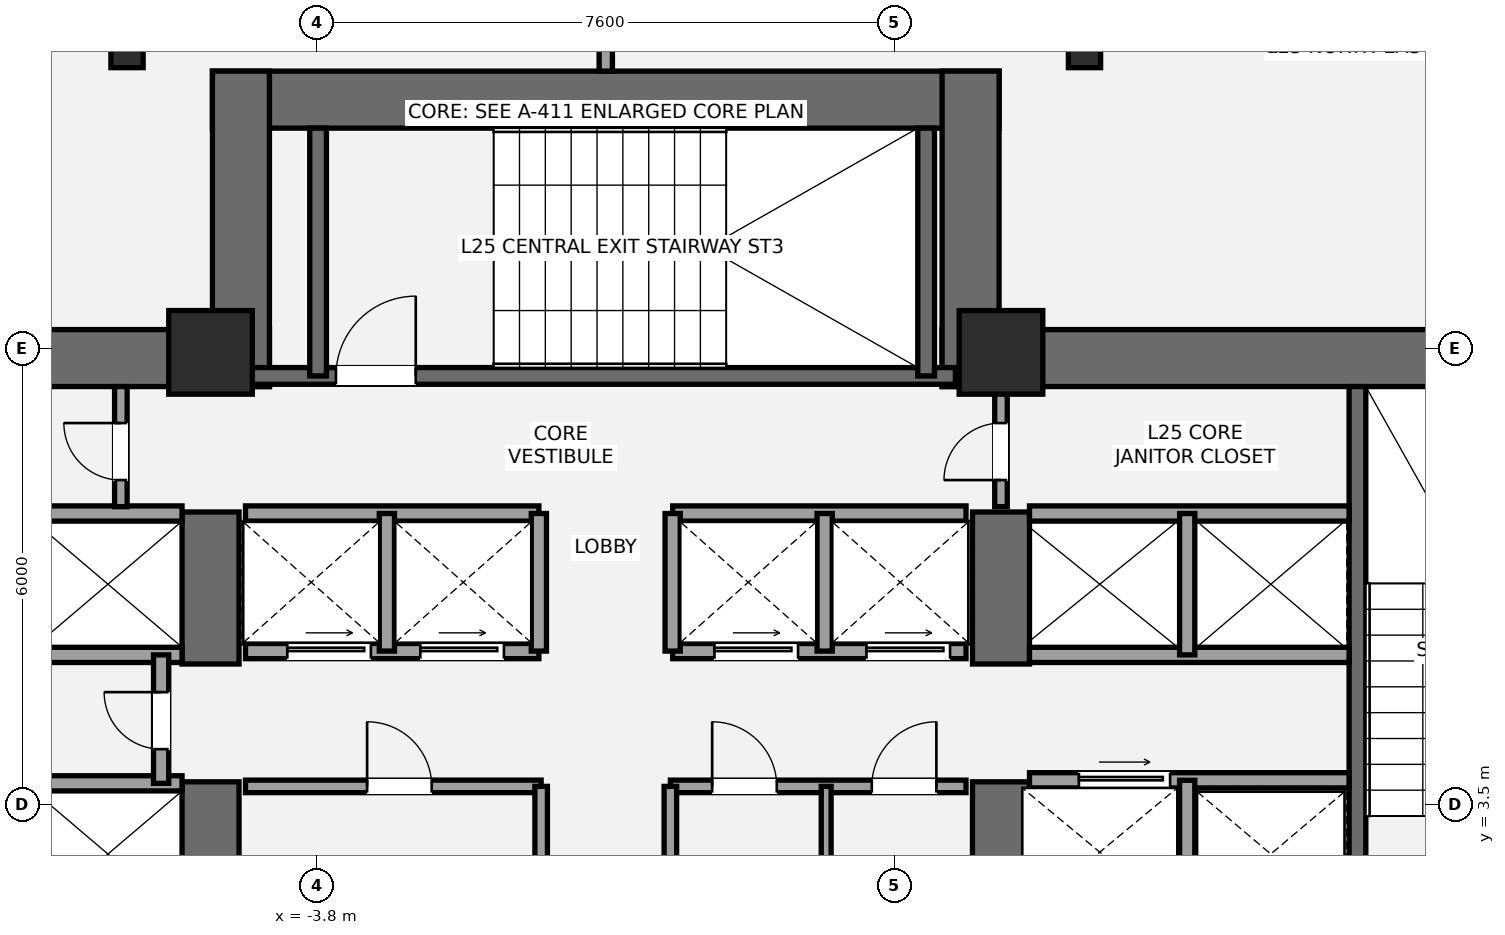
"""IFC4 building model, lengths in metres.
Left out: names, types, materials, properties, quantities, classifications, styles, units other than length and angle.
Written with IfcOpenShell. Run it as: python <this file> out.ifc"""

import sys

from ifc_helpers import new_model, si_unit, direction, frame, frame_2d, origin, origin_2d, place, context, subcontext, project, spatial, rectangle, i_section, extrude, element, fill, save


model = new_model("IFC4")
c1 = context("Model", 3, precision=1e-05, world=origin(), true_north=direction((0.0, 1.0)))
c2 = subcontext(c1, "Body", "Model", "MODEL_VIEW")
j1 = project(units=[si_unit("LENGTHUNIT", "METRE"), si_unit("PLANEANGLEUNIT", "RADIAN")], contexts=[c1])
p1 = place(None, origin())
s1 = spatial("IfcSite", under=j1, at=p1, CompositionType="ELEMENT")
p2 = place(p1, origin())
s2 = spatial("IfcBuilding", under=s1, at=p2, CompositionType="ELEMENT")
p3 = place(p2, frame((0.0, 0.0, 96.6)))
s3 = spatial("IfcBuildingStorey", under=s2, at=p3, CompositionType="ELEMENT", Elevation=96.6)
p4 = place(p3, frame((-13.9, 9.375, 0.0), z_axis=(0.0, 0.0, 1.0), x_axis=(1.0, 0.0, 0.0)))
e1 = element("IfcWall", 1, at=p4, inside=s3, PredefinedType="SHEAR", context=c2, shape_type="SweptSolid", body=[
    extrude(rectangle(XDim=9.475, YDim=0.75, at=frame_2d((4.737, 0.0))), origin(), (0.0, 0.0, 1.0), 3.5),
])
p5 = place(p3, frame((-5.2, 1.1, 0.0), z_axis=(0.0, 0.0, 1.0), x_axis=(0.0, 1.0, 0.0)))
e2 = element("IfcWall", 2, at=p5, inside=s3, PredefinedType="SHEAR", context=c2, shape_type="SweptSolid", body=[
    extrude(rectangle(XDim=2.7, YDim=0.75, at=frame_2d((1.35, 0.0))), origin(), (0.0, 0.0, 1.0), 3.5),
])
p6 = place(p3, frame((-5.2, 5.35, 0.0), z_axis=(0.0, 0.0, 1.0), x_axis=(0.0, 1.0, 0.0)))
e3 = element("IfcWall", 3, at=p6, inside=s3, PredefinedType="SHEAR", context=c2, shape_type="SweptSolid", body=[
    extrude(rectangle(XDim=2.0, YDim=0.75, at=frame_2d((1.0, 0.0))), origin(), (0.0, 0.0, 1.0), 3.5),
])
p7 = place(p3, frame((4.425, 9.375, 0.0), z_axis=(0.0, 0.0, 1.0), x_axis=(1.0, 0.0, 0.0)))
e4 = element("IfcWall", 4, at=p7, inside=s3, PredefinedType="SHEAR", context=c2, shape_type="SweptSolid", body=[
    extrude(rectangle(XDim=9.475, YDim=0.75, at=frame_2d((4.737, 0.0))), origin(), (0.0, 0.0, 1.0), 3.5),
])
p8 = place(p3, frame((5.2, 1.1, 0.0), z_axis=(0.0, 0.0, 1.0), x_axis=(0.0, 1.0, 0.0)))
e5 = element("IfcWall", 5, at=p8, inside=s3, PredefinedType="SHEAR", context=c2, shape_type="SweptSolid", body=[
    extrude(rectangle(XDim=2.7, YDim=0.75, at=frame_2d((1.35, 0.0))), origin(), (0.0, 0.0, 1.0), 3.5),
])
p9 = place(p3, frame((5.2, 5.35, 0.0), z_axis=(0.0, 0.0, 1.0), x_axis=(0.0, 1.0, 0.0)))
e6 = element("IfcWall", 6, at=p9, inside=s3, PredefinedType="SHEAR", context=c2, shape_type="SweptSolid", body=[
    extrude(rectangle(XDim=2.0, YDim=0.75, at=frame_2d((1.0, 0.0))), origin(), (0.0, 0.0, 1.0), 3.5),
])
p10 = place(p3, frame((9.89, 1.85, 0.0), z_axis=(0.0, 0.0, 1.0), x_axis=(0.0, 1.0, 0.0)))
e7 = element("IfcWall", 7, at=p10, inside=s3, PredefinedType="SHEAR", context=c2, shape_type="SweptSolid", body=[
    extrude(rectangle(XDim=7.15, YDim=0.22, at=frame_2d((3.575, 0.0))), origin(), (0.0, 0.0, 1.0), 3.5),
])
p11 = place(p3, frame((-5.175, 12.775, 0.0), z_axis=(0.0, 0.0, 1.0), x_axis=(1.0, 0.0, 0.0)))
e8 = element("IfcWall", 8, at=p11, inside=s3, PredefinedType="SHEAR", context=c2, shape_type="SweptSolid", body=[
    extrude(rectangle(XDim=10.35, YDim=0.75, at=frame_2d((5.175, 0.0))), origin(), (0.0, 0.0, 1.0), 3.5),
])
for number, where, z_axis, x_axis in (
    (9, (-4.8, 9.0, 0.0), (0.0, 0.0, 1.0), (0.0, 1.0, 0.0)),
    (10, (4.8, 9.0, 0.0), (0.0, 0.0, 1.0), (0.0, 1.0, 0.0)),
):
    element("IfcWall", number, at=place(p3, frame(where, z_axis=z_axis, x_axis=x_axis)), inside=s3, PredefinedType="SHEAR", context=c2, shape_type="SweptSolid", body=[
        extrude(rectangle(XDim=4.15, YDim=0.75, at=frame_2d((2.075, 0.0))), origin(), (0.0, 0.0, 1.0), 3.5),
    ])
p12 = place(p3, frame((-4.7, 9.14, 0.0), z_axis=(0.0, 0.0, 1.0), x_axis=(1.0, 0.0, 0.0)))
e11 = element("IfcWall", 11, at=p12, inside=s3, PredefinedType="SHEAR", context=c2, shape_type="SweptSolid", body=[
    extrude(rectangle(XDim=9.3, YDim=0.22, at=frame_2d((4.65, 0.0))), origin(), (0.0, 0.0, 1.0), 3.5),
])
p13 = place(p12, frame((1.15, 0.0, 0.0)))
e12 = element("IfcOpeningElement", 12, at=p13, cuts=e11, PredefinedType="OPENING", context=c2, shape_type="SweptSolid", body=[
    extrude(rectangle(XDim=1.05, YDim=2.15, at=frame_2d((0.525, 1.075))), frame((0.0, 0.12, 0.0), z_axis=(0.0, -1.0, 0.0), x_axis=(1.0, 0.0, 0.0)), (0.0, 0.0, 1.0), 0.24),
])
for number, where, z_axis, x_axis in (
    (13, (-3.785, 9.14, 0.0), (0.0, 0.0, 1.0), (0.0, 1.0, 0.0)),
    (14, (4.215, 9.14, 0.0), (0.0, 0.0, 1.0), (0.0, 1.0, 0.0)),
):
    element("IfcWall", number, at=place(p3, frame(where, z_axis=z_axis, x_axis=x_axis)), inside=s3, PredefinedType="SHEAR", context=c2, shape_type="SweptSolid", body=[
        extrude(rectangle(XDim=3.26, YDim=0.22, at=frame_2d((1.63, 0.0))), origin(), (0.0, 0.0, 1.0), 3.5),
    ])
for number, where, z_axis, x_axis in (
    (15, (-5.2, 9.45, 0.0), (0.0, 0.0, 1.0), (1.0, 0.0, 0.0)),
    (16, (5.2, 9.45, 0.0), (0.0, 0.0, 1.0), (1.0, 0.0, 0.0)),
):
    element("IfcColumn", number, at=place(p3, frame(where, z_axis=z_axis, x_axis=x_axis)), inside=s3, PredefinedType="COLUMN", context=c2, shape_type="SweptSolid", body=[
        extrude(rectangle(XDim=1.1, YDim=1.1, at=origin_2d()), origin(), (0.0, 0.0, 1.0), 3.5),
    ])
for number, where, z_axis, x_axis in (
    (17, (6.299, 13.433, 0.0), (0.0, 0.0, 1.0), (1.0, 0.0, 0.0)),
    (18, (-6.299, 13.433, 0.0), (0.0, 0.0, 1.0), (1.0, 0.0, 0.0)),
):
    element("IfcColumn", number, at=place(p3, frame(where, z_axis=z_axis, x_axis=x_axis)), inside=s3, PredefinedType="COLUMN", context=c2, shape_type="SweptSolid", body=[
        extrude(i_section(OverallWidth=0.424, OverallDepth=0.474, WebThickness=0.048, FlangeThickness=0.077, at=origin_2d()), origin(), (0.0, 0.0, 1.0), 3.5),
    ])
for number, where, z_axis, x_axis in (
    (19, (-9.78, 3.78, 0.0), (0.0, 0.0, 1.0), (1.0, 0.0, 0.0)),
    (20, (-9.78, 5.47, 0.0), (0.0, 0.0, 1.0), (1.0, 0.0, 0.0)),
    (21, (-9.78, 7.33, 0.0), (0.0, 0.0, 1.0), (1.0, 0.0, 0.0)),
):
    element("IfcWall", number, at=place(p3, frame(where, z_axis=z_axis, x_axis=x_axis)), inside=s3, PredefinedType="SOLIDWALL", context=c2, shape_type="SweptSolid", body=[
        extrude(rectangle(XDim=4.205, YDim=0.2, at=frame_2d((2.103, 0.0))), origin(), (0.0, 0.0, 1.0), 3.31),
    ])
p14 = place(p3, frame((-5.85, 3.78, 0.0), z_axis=(0.0, 0.0, 1.0), x_axis=(0.0, 1.0, 0.0)))
e22 = element("IfcWall", 22, at=p14, inside=s3, PredefinedType="SOLIDWALL", context=c2, shape_type="SweptSolid", body=[
    extrude(rectangle(XDim=1.69, YDim=0.2, at=frame_2d((0.845, 0.0))), origin(), (0.0, 0.0, 1.0), 3.31),
])
p15 = place(p14, frame((0.45, 0.0, 0.0)))
e23 = element("IfcOpeningElement", 23, at=p15, cuts=e22, PredefinedType="OPENING", context=c2, shape_type="SweptSolid", body=[
    extrude(rectangle(XDim=0.75, YDim=2.1, at=frame_2d((0.375, 1.05))), frame((0.0, 0.11, 0.0), z_axis=(0.0, -1.0, 0.0), x_axis=(1.0, 0.0, 0.0)), (0.0, 0.0, 1.0), 0.22),
])
p16 = place(p3, frame((5.575, 3.82, 0.0), z_axis=(0.0, 0.0, 1.0), x_axis=(1.0, 0.0, 0.0)))
e24 = element("IfcWall", 24, at=p16, inside=s3, PredefinedType="SOLIDWALL", context=c2, shape_type="SweptSolid", body=[
    extrude(rectangle(XDim=4.205, YDim=0.2, at=frame_2d((2.103, 0.0))), origin(), (0.0, 0.0, 1.0), 3.31),
])
p17 = place(p16, frame((0.65, 0.0, 0.0)))
e25 = element("IfcOpeningElement", 25, at=p17, cuts=e24, PredefinedType="OPENING", context=c2, shape_type="SweptSolid", body=[
    extrude(rectangle(XDim=1.2, YDim=2.2, at=frame_2d((0.6, 1.1))), frame((0.0, 0.11, 0.0), z_axis=(0.0, -1.0, 0.0), x_axis=(1.0, 0.0, 0.0)), (0.0, 0.0, 1.0), 0.22),
])
p18 = place(p3, frame((7.65, 1.85, 0.0), z_axis=(0.0, 0.0, 1.0), x_axis=(0.0, 1.0, 0.0)))
e26 = element("IfcWall", 26, at=p18, inside=s3, PredefinedType="SOLIDWALL", context=c2, shape_type="SweptSolid", body=[
    extrude(rectangle(XDim=1.97, YDim=0.2, at=frame_2d((0.985, 0.0))), origin(), (0.0, 0.0, 1.0), 3.31),
])
for number, where, z_axis, x_axis in (
    (27, (5.575, 5.47, 0.0), (0.0, 0.0, 1.0), (1.0, 0.0, 0.0)),
    (28, (5.575, 7.33, 0.0), (0.0, 0.0, 1.0), (1.0, 0.0, 0.0)),
):
    element("IfcWall", number, at=place(p3, frame(where, z_axis=z_axis, x_axis=x_axis)), inside=s3, PredefinedType="SOLIDWALL", context=c2, shape_type="SweptSolid", body=[
        extrude(rectangle(XDim=4.205, YDim=0.2, at=frame_2d((2.103, 0.0))), origin(), (0.0, 0.0, 1.0), 3.31),
    ])
p19 = place(p3, frame((7.65, 5.47, 0.0), z_axis=(0.0, 0.0, 1.0), x_axis=(0.0, 1.0, 0.0)))
e29 = element("IfcWall", 29, at=p19, inside=s3, PredefinedType="SOLIDWALL", context=c2, shape_type="SweptSolid", body=[
    extrude(rectangle(XDim=1.86, YDim=0.2, at=frame_2d((0.93, 0.0))), origin(), (0.0, 0.0, 1.0), 3.31),
])
p20 = place(p3, frame((-4.74, 3.74, 0.0), z_axis=(0.0, 0.0, 1.0), x_axis=(1.0, 0.0, 0.0)))
e30 = element("IfcWall", 30, at=p20, inside=s3, PredefinedType="PARTITIONING", context=c2, shape_type="SweptSolid", body=[
    extrude(rectangle(XDim=3.89, YDim=0.165, at=frame_2d((1.945, 0.0))), origin(), (0.0, 0.0, 1.0), 3.31),
])
p21 = place(p20, frame((1.6, 0.0, 0.0)))
e31 = element("IfcOpeningElement", 31, at=p21, cuts=e30, PredefinedType="OPENING", context=c2, shape_type="SweptSolid", body=[
    extrude(rectangle(XDim=0.85, YDim=2.1, at=frame_2d((0.425, 1.05))), frame((0.0, 0.093, 0.0), z_axis=(0.0, -1.0, 0.0), x_axis=(1.0, 0.0, 0.0)), (0.0, 0.0, 1.0), 0.185),
])
p22 = place(p3, frame((-0.85, 1.92, 0.0), z_axis=(0.0, 0.0, 1.0), x_axis=(0.0, 1.0, 0.0)))
e32 = element("IfcWall", 32, at=p22, inside=s3, PredefinedType="PARTITIONING", context=c2, shape_type="SweptSolid", body=[
    extrude(rectangle(XDim=1.82, YDim=0.165, at=frame_2d((0.91, 0.0))), origin(), (0.0, 0.0, 1.0), 3.31),
])
p23 = place(p3, frame((0.85, 3.74, 0.0), z_axis=(0.0, 0.0, 1.0), x_axis=(1.0, 0.0, 0.0)))
e33 = element("IfcWall", 33, at=p23, inside=s3, PredefinedType="PARTITIONING", context=c2, shape_type="SweptSolid", body=[
    extrude(rectangle(XDim=3.89, YDim=0.165, at=frame_2d((1.945, 0.0))), origin(), (0.0, 0.0, 1.0), 3.31),
])
p24 = place(p23, frame((0.55, 0.0, 0.0)))
e34 = element("IfcOpeningElement", 34, at=p24, cuts=e33, PredefinedType="OPENING", context=c2, shape_type="SweptSolid", body=[
    extrude(rectangle(XDim=0.85, YDim=2.1, at=frame_2d((0.425, 1.05))), frame((0.0, 0.093, 0.0), z_axis=(0.0, -1.0, 0.0), x_axis=(1.0, 0.0, 0.0)), (0.0, 0.0, 1.0), 0.185),
])
p25 = place(p23, frame((2.65, 0.0, 0.0)))
e35 = element("IfcOpeningElement", 35, at=p25, cuts=e33, PredefinedType="OPENING", context=c2, shape_type="SweptSolid", body=[
    extrude(rectangle(XDim=0.85, YDim=2.1, at=frame_2d((0.425, 1.05))), frame((0.0, 0.093, 0.0), z_axis=(0.0, -1.0, 0.0), x_axis=(1.0, 0.0, 0.0)), (0.0, 0.0, 1.0), 0.185),
])
p26 = place(p3, frame((0.85, 1.92, 0.0), z_axis=(0.0, 0.0, 1.0), x_axis=(0.0, 1.0, 0.0)))
e36 = element("IfcWall", 36, at=p26, inside=s3, PredefinedType="PARTITIONING", context=c2, shape_type="SweptSolid", body=[
    extrude(rectangle(XDim=1.82, YDim=0.165, at=frame_2d((0.91, 0.0))), origin(), (0.0, 0.0, 1.0), 3.31),
])
p27 = place(p3, frame((2.9, 1.92, 0.0), z_axis=(0.0, 0.0, 1.0), x_axis=(0.0, 1.0, 0.0)))
e37 = element("IfcWall", 37, at=p27, inside=s3, PredefinedType="PARTITIONING", context=c2, shape_type="SweptSolid", body=[
    extrude(rectangle(XDim=1.82, YDim=0.13, at=frame_2d((0.91, 0.0))), origin(), (0.0, 0.0, 1.0), 3.31),
])
p28 = place(p3, frame((-4.74, 5.52, 0.0), z_axis=(0.0, 0.0, 1.0), x_axis=(1.0, 0.0, 0.0)))
e38 = element("IfcWall", 38, at=p28, inside=s3, PredefinedType="SOLIDWALL", context=c2, shape_type="SweptSolid", body=[
    extrude(rectangle(XDim=3.86, YDim=0.2, at=frame_2d((1.93, 0.0))), origin(), (0.0, 0.0, 1.0), 3.31),
])
p29 = place(p28, frame((0.55, 0.0, 0.0)))
e39 = element("IfcOpeningElement", 39, at=p29, cuts=e38, PredefinedType="OPENING", context=c2, shape_type="SweptSolid", body=[
    extrude(rectangle(XDim=1.1, YDim=2.2, at=frame_2d((0.55, 1.1))), frame((0.0, 0.11, 0.0), z_axis=(0.0, -1.0, 0.0), x_axis=(1.0, 0.0, 0.0)), (0.0, 0.0, 1.0), 0.22),
])
p30 = place(p28, frame((2.3, 0.0, 0.0)))
e40 = element("IfcOpeningElement", 40, at=p30, cuts=e38, PredefinedType="OPENING", context=c2, shape_type="SweptSolid", body=[
    extrude(rectangle(XDim=1.1, YDim=2.2, at=frame_2d((0.55, 1.1))), frame((0.0, 0.11, 0.0), z_axis=(0.0, -1.0, 0.0), x_axis=(1.0, 0.0, 0.0)), (0.0, 0.0, 1.0), 0.22),
])
p31 = place(p3, frame((0.88, 5.52, 0.0), z_axis=(0.0, 0.0, 1.0), x_axis=(1.0, 0.0, 0.0)))
e41 = element("IfcWall", 41, at=p31, inside=s3, PredefinedType="SOLIDWALL", context=c2, shape_type="SweptSolid", body=[
    extrude(rectangle(XDim=3.86, YDim=0.2, at=frame_2d((1.93, 0.0))), origin(), (0.0, 0.0, 1.0), 3.31),
])
p32 = place(p31, frame((0.55, 0.0, 0.0)))
e42 = element("IfcOpeningElement", 42, at=p32, cuts=e41, PredefinedType="OPENING", context=c2, shape_type="SweptSolid", body=[
    extrude(rectangle(XDim=1.1, YDim=2.2, at=frame_2d((0.55, 1.1))), frame((0.0, 0.11, 0.0), z_axis=(0.0, -1.0, 0.0), x_axis=(1.0, 0.0, 0.0)), (0.0, 0.0, 1.0), 0.22),
])
p33 = place(p31, frame((2.55, 0.0, 0.0)))
e43 = element("IfcOpeningElement", 43, at=p33, cuts=e41, PredefinedType="OPENING", context=c2, shape_type="SweptSolid", body=[
    extrude(rectangle(XDim=1.1, YDim=2.2, at=frame_2d((0.55, 1.1))), frame((0.0, 0.11, 0.0), z_axis=(0.0, -1.0, 0.0), x_axis=(1.0, 0.0, 0.0)), (0.0, 0.0, 1.0), 0.22),
])
for number, where, z_axis, x_axis in (
    (44, (-4.74, 7.33, 0.0), (0.0, 0.0, 1.0), (1.0, 0.0, 0.0)),
    (45, (0.88, 7.33, 0.0), (0.0, 0.0, 1.0), (1.0, 0.0, 0.0)),
):
    element("IfcWall", number, at=place(p3, frame(where, z_axis=z_axis, x_axis=x_axis)), inside=s3, PredefinedType="SOLIDWALL", context=c2, shape_type="SweptSolid", body=[
        extrude(rectangle(XDim=3.86, YDim=0.2, at=frame_2d((1.93, 0.0))), origin(), (0.0, 0.0, 1.0), 3.31),
    ])
for number, where, z_axis, x_axis in (
    (46, (-2.88, 5.52, 0.0), (0.0, 0.0, 1.0), (0.0, 1.0, 0.0)),
    (47, (2.88, 5.52, 0.0), (0.0, 0.0, 1.0), (0.0, 1.0, 0.0)),
    (48, (-0.88, 5.52, 0.0), (0.0, 0.0, 1.0), (0.0, 1.0, 0.0)),
    (49, (0.88, 5.52, 0.0), (0.0, 0.0, 1.0), (0.0, 1.0, 0.0)),
):
    element("IfcWall", number, at=place(p3, frame(where, z_axis=z_axis, x_axis=x_axis)), inside=s3, PredefinedType="SOLIDWALL", context=c2, shape_type="SweptSolid", body=[
        extrude(rectangle(XDim=1.81, YDim=0.2, at=frame_2d((0.905, 0.0))), origin(), (0.0, 0.0, 1.0), 3.31),
    ])
p34 = place(p3, frame((-6.38, 7.42, 0.0), z_axis=(0.0, 0.0, 1.0), x_axis=(0.0, 1.0, 0.0)))
e50 = element("IfcWall", 50, at=p34, inside=s3, PredefinedType="PARTITIONING", context=c2, shape_type="SweptSolid", body=[
    extrude(rectangle(XDim=1.58, YDim=0.165, at=frame_2d((0.79, 0.0))), origin(), (0.0, 0.0, 1.0), 3.31),
])
p35 = place(p34, frame((0.35, 0.0, 0.0)))
e51 = element("IfcOpeningElement", 51, at=p35, cuts=e50, PredefinedType="OPENING", context=c2, shape_type="SweptSolid", body=[
    extrude(rectangle(XDim=0.75, YDim=2.1, at=frame_2d((0.375, 1.05))), frame((0.0, 0.093, 0.0), z_axis=(0.0, -1.0, 0.0), x_axis=(1.0, 0.0, 0.0)), (0.0, 0.0, 1.0), 0.185),
])
p36 = place(p3, frame((5.2, 7.42, 0.0), z_axis=(0.0, 0.0, 1.0), x_axis=(0.0, 1.0, 0.0)))
e52 = element("IfcWall", 52, at=p36, inside=s3, PredefinedType="PARTITIONING", context=c2, shape_type="SweptSolid", body=[
    extrude(rectangle(XDim=1.58, YDim=0.165, at=frame_2d((0.79, 0.0))), origin(), (0.0, 0.0, 1.0), 3.31),
])
p37 = place(p36, frame((0.35, 0.0, 0.0)))
e53 = element("IfcOpeningElement", 53, at=p37, cuts=e52, PredefinedType="OPENING", context=c2, shape_type="SweptSolid", body=[
    extrude(rectangle(XDim=0.75, YDim=2.1, at=frame_2d((0.375, 1.05))), frame((0.0, 0.093, 0.0), z_axis=(0.0, -1.0, 0.0), x_axis=(1.0, 0.0, 0.0)), (0.0, 0.0, 1.0), 0.185),
])
p38 = place(p3, frame((0.0, 13.15, 0.0), z_axis=(0.0, 0.0, 1.0), x_axis=(0.0, 1.0, 0.0)))
e54 = element("IfcWall", 54, at=p38, inside=s3, PredefinedType="PARTITIONING", context=c2, shape_type="SweptSolid", body=[
    extrude(rectangle(XDim=5.594, YDim=0.175, at=frame_2d((2.797, 0.0))), origin(), (0.0, 0.0, 1.0), 3.31),
])
p39 = place(p13, origin())
e55 = element("IfcDoor", 55, at=p39, inside=s3, OperationType="SINGLE_SWING_RIGHT", PredefinedType="DOOR", context=c2, shape_type="SweptSolid", body=[
    extrude(rectangle(XDim=1.05, YDim=2.15, at=frame_2d((0.525, 1.075))), frame((0.0, 0.025, 0.0), z_axis=(0.0, -1.0, 0.0), x_axis=(1.0, 0.0, 0.0)), (0.0, 0.0, 1.0), 0.05),
])
fill(e12, e55)
p40 = place(p15, origin())
e56 = element("IfcDoor", 56, at=p40, inside=s3, OperationType="SINGLE_SWING_RIGHT", PredefinedType="DOOR", context=c2, shape_type="SweptSolid", body=[
    extrude(rectangle(XDim=0.75, YDim=2.1, at=frame_2d((0.375, 1.05))), frame((0.0, 0.025, 0.0), z_axis=(0.0, -1.0, 0.0), x_axis=(1.0, 0.0, 0.0)), (0.0, 0.0, 1.0), 0.05),
])
fill(e23, e56)
p41 = place(p17, origin())
e57 = element("IfcDoor", 57, at=p41, inside=s3, OperationType="SLIDING_TO_RIGHT", PredefinedType="DOOR", context=c2, shape_type="SweptSolid", body=[
    extrude(rectangle(XDim=1.2, YDim=2.2, at=frame_2d((0.6, 1.1))), frame((0.0, 0.025, 0.0), z_axis=(0.0, -1.0, 0.0), x_axis=(1.0, 0.0, 0.0)), (0.0, 0.0, 1.0), 0.05),
])
fill(e25, e57)
p42 = place(p21, origin())
e58 = element("IfcDoor", 58, at=p42, inside=s3, OperationType="SINGLE_SWING_LEFT", PredefinedType="DOOR", context=c2, shape_type="SweptSolid", body=[
    extrude(rectangle(XDim=0.85, YDim=2.1, at=frame_2d((0.425, 1.05))), frame((0.0, 0.025, 0.0), z_axis=(0.0, -1.0, 0.0), x_axis=(1.0, 0.0, 0.0)), (0.0, 0.0, 1.0), 0.05),
])
fill(e31, e58)
p43 = place(p24, origin())
e59 = element("IfcDoor", 59, at=p43, inside=s3, OperationType="SINGLE_SWING_LEFT", PredefinedType="DOOR", context=c2, shape_type="SweptSolid", body=[
    extrude(rectangle(XDim=0.85, YDim=2.1, at=frame_2d((0.425, 1.05))), frame((0.0, 0.025, 0.0), z_axis=(0.0, -1.0, 0.0), x_axis=(1.0, 0.0, 0.0)), (0.0, 0.0, 1.0), 0.05),
])
fill(e34, e59)
p44 = place(p25, origin())
e60 = element("IfcDoor", 60, at=p44, inside=s3, OperationType="SINGLE_SWING_RIGHT", PredefinedType="DOOR", context=c2, shape_type="SweptSolid", body=[
    extrude(rectangle(XDim=0.85, YDim=2.1, at=frame_2d((0.425, 1.05))), frame((0.0, 0.025, 0.0), z_axis=(0.0, -1.0, 0.0), x_axis=(1.0, 0.0, 0.0)), (0.0, 0.0, 1.0), 0.05),
])
fill(e35, e60)
p45 = place(p29, origin())
e61 = element("IfcDoor", 61, at=p45, inside=s3, OperationType="SLIDING_TO_LEFT", PredefinedType="DOOR", context=c2, shape_type="SweptSolid", body=[
    extrude(rectangle(XDim=1.1, YDim=2.2, at=frame_2d((0.55, 1.1))), frame((0.0, 0.025, 0.0), z_axis=(0.0, -1.0, 0.0), x_axis=(1.0, 0.0, 0.0)), (0.0, 0.0, 1.0), 0.05),
])
fill(e39, e61)
p46 = place(p30, origin())
e62 = element("IfcDoor", 62, at=p46, inside=s3, OperationType="SLIDING_TO_LEFT", PredefinedType="DOOR", context=c2, shape_type="SweptSolid", body=[
    extrude(rectangle(XDim=1.1, YDim=2.2, at=frame_2d((0.55, 1.1))), frame((0.0, 0.025, 0.0), z_axis=(0.0, -1.0, 0.0), x_axis=(1.0, 0.0, 0.0)), (0.0, 0.0, 1.0), 0.05),
])
fill(e40, e62)
p47 = place(p32, origin())
e63 = element("IfcDoor", 63, at=p47, inside=s3, OperationType="SLIDING_TO_LEFT", PredefinedType="DOOR", context=c2, shape_type="SweptSolid", body=[
    extrude(rectangle(XDim=1.1, YDim=2.2, at=frame_2d((0.55, 1.1))), frame((0.0, 0.025, 0.0), z_axis=(0.0, -1.0, 0.0), x_axis=(1.0, 0.0, 0.0)), (0.0, 0.0, 1.0), 0.05),
])
fill(e42, e63)
p48 = place(p33, origin())
e64 = element("IfcDoor", 64, at=p48, inside=s3, OperationType="SLIDING_TO_LEFT", PredefinedType="DOOR", context=c2, shape_type="SweptSolid", body=[
    extrude(rectangle(XDim=1.1, YDim=2.2, at=frame_2d((0.55, 1.1))), frame((0.0, 0.025, 0.0), z_axis=(0.0, -1.0, 0.0), x_axis=(1.0, 0.0, 0.0)), (0.0, 0.0, 1.0), 0.05),
])
fill(e43, e64)
p49 = place(p35, origin())
e65 = element("IfcDoor", 65, at=p49, inside=s3, OperationType="SINGLE_SWING_RIGHT", PredefinedType="DOOR", context=c2, shape_type="SweptSolid", body=[
    extrude(rectangle(XDim=0.75, YDim=2.1, at=frame_2d((0.375, 1.05))), frame((0.0, 0.025, 0.0), z_axis=(0.0, -1.0, 0.0), x_axis=(1.0, 0.0, 0.0)), (0.0, 0.0, 1.0), 0.05),
])
fill(e51, e65)
p50 = place(p37, origin())
e66 = element("IfcDoor", 66, at=p50, inside=s3, OperationType="SINGLE_SWING_LEFT", PredefinedType="DOOR", context=c2, shape_type="SweptSolid", body=[
    extrude(rectangle(XDim=0.75, YDim=2.1, at=frame_2d((0.375, 1.05))), frame((0.0, 0.025, 0.0), z_axis=(0.0, -1.0, 0.0), x_axis=(1.0, 0.0, 0.0)), (0.0, 0.0, 1.0), 0.05),
])
fill(e53, e66)
save(model, sys.argv[1])
